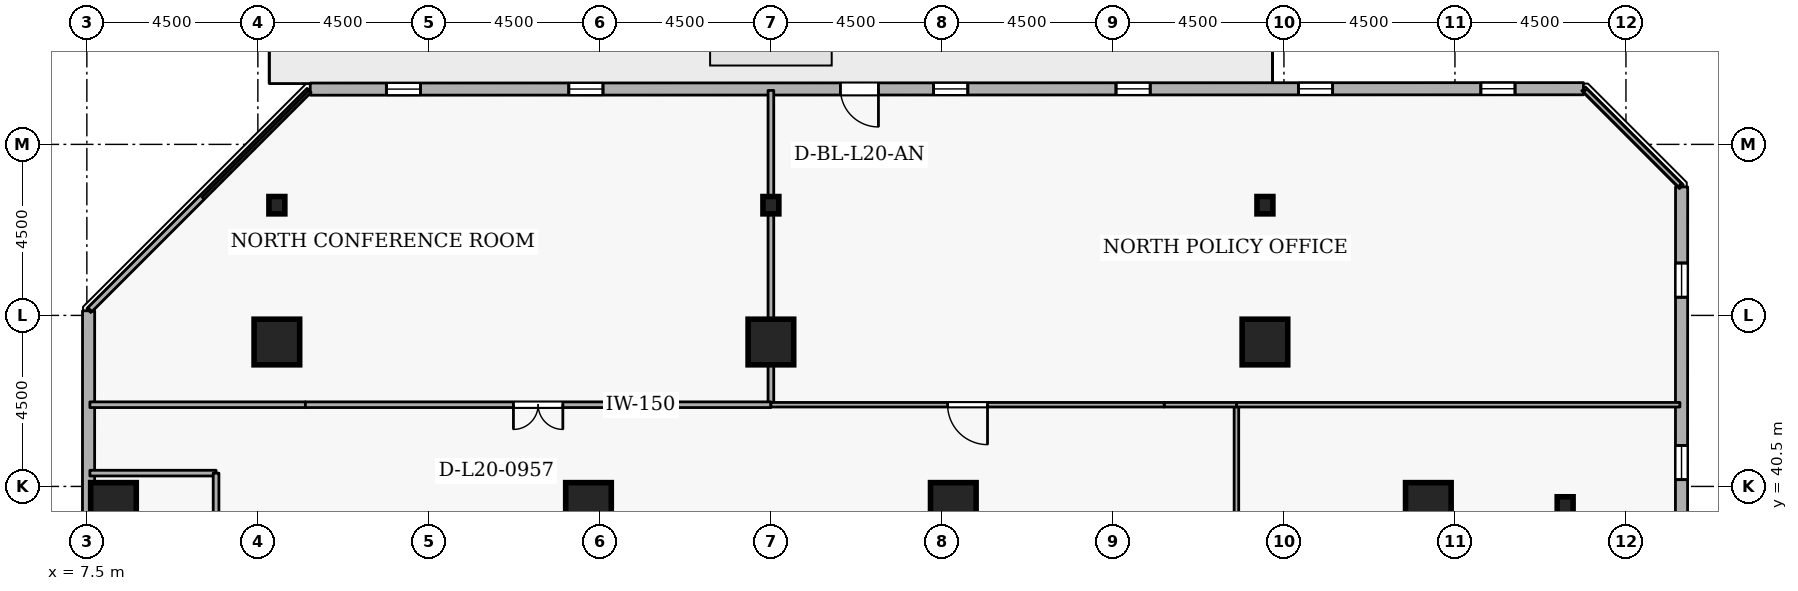
"""IFC4 building model, lengths in metres.
Left out: names, types, materials, properties, quantities, classifications, styles, units other than length and angle.
Written with IfcOpenShell. Run it as: python <this file> out.ifc"""

import sys

from ifc_helpers import new_model, si_unit, direction, frame, frame_2d, origin, origin_2d, place, context, subcontext, project, spatial, rectangle, i_section, extrude, element, fill, save


model = new_model("IFC4")
c1 = context("Model", 3, precision=1e-05, world=origin(), true_north=direction((0.0, 1.0)))
c2 = subcontext(c1, "Body", "Model", "MODEL_VIEW")
j1 = project(units=[si_unit("LENGTHUNIT", "METRE"), si_unit("PLANEANGLEUNIT", "RADIAN")], contexts=[c1])
p1 = place(None, origin())
s1 = spatial("IfcSite", under=j1, at=p1, CompositionType="ELEMENT")
p2 = place(p1, origin())
s2 = spatial("IfcBuilding", under=s1, at=p2, CompositionType="ELEMENT")
p3 = place(p2, frame((0.0, 0.0, 80.1)))
s3 = spatial("IfcBuildingStorey", under=s2, at=p3, CompositionType="ELEMENT", Elevation=80.1)
for number, where, z_axis, x_axis in (
    (1, (42.8, 40.0, 0.0), (0.0, 0.0, 1.0), (1.0, 0.0, 0.0)),
    (2, (12.5, 44.3, 0.0), (0.0, 0.0, 1.0), (1.0, 0.0, 0.0)),
    (3, (25.5, 44.3, 0.0), (0.0, 0.0, 1.0), (1.0, 0.0, 0.0)),
    (4, (38.5, 44.3, 0.0), (0.0, 0.0, 1.0), (1.0, 0.0, 0.0)),
    (5, (8.2, 40.0, 0.0), (0.0, 0.0, 1.0), (1.0, 0.0, 0.0)),
    (6, (20.7, 40.0, 0.0), (0.0, 0.0, 1.0), (1.0, 0.0, 0.0)),
    (7, (30.3, 40.0, 0.0), (0.0, 0.0, 1.0), (1.0, 0.0, 0.0)),
):
    element("IfcColumn", number, at=place(p3, frame(where, z_axis=z_axis, x_axis=x_axis)), inside=s3, PredefinedType="COLUMN", context=c2, shape_type="SweptSolid", body=[
        extrude(rectangle(XDim=1.2, YDim=1.2, at=origin_2d()), origin(), (0.0, 0.0, 1.0), 3.6),
    ])
for number, where, z_axis, x_axis in (
    (8, (46.4, 40.0, 0.0), (0.0, 0.0, 1.0), (1.0, 0.0, 0.0)),
    (9, (12.5, 47.9, 0.0), (0.0, 0.0, 1.0), (1.0, 0.0, 0.0)),
    (10, (25.5, 47.9, 0.0), (0.0, 0.0, 1.0), (1.0, 0.0, 0.0)),
    (11, (38.5, 47.9, 0.0), (0.0, 0.0, 1.0), (1.0, 0.0, 0.0)),
):
    element("IfcColumn", number, at=place(p3, frame(where, z_axis=z_axis, x_axis=x_axis)), inside=s3, PredefinedType="COLUMN", context=c2, shape_type="SweptSolid", body=[
        extrude(i_section(OverallWidth=0.418, OverallDepth=0.456, WebThickness=0.042, FlangeThickness=0.067, FilletRadius=0.015, at=origin_2d()), origin(), (0.0, 0.0, 1.0), 3.6),
    ])
p4 = place(p3, frame((49.454, 14.878, 0.0), z_axis=(0.0, 0.0, 1.0), x_axis=(0.000313347115, 0.999999950907, 0.0)))
e12 = element("IfcWall", 12, at=p4, inside=s3, PredefinedType="STANDARD", context=c2, shape_type="SweptSolid", body=[
    extrude(rectangle(XDim=33.503, YDim=0.32, at=frame_2d((16.751, 0.0))), origin(), (0.0, 0.0, 1.0), 2.7),
])
p5 = place(p4, frame((1.8, 0.0, 0.72)))
e13 = element("IfcOpeningElement", 13, at=p5, cuts=e12, PredefinedType="OPENING", context=c2, shape_type="SweptSolid", body=[
    extrude(rectangle(XDim=0.9, YDim=1.75, at=frame_2d((0.45, 0.875))), frame((0.0, 0.17, 0.0), z_axis=(0.0, -1.0, 0.0), x_axis=(1.0, 0.0, 0.0)), (0.0, 0.0, 1.0), 0.34),
])
p6 = place(p4, frame((6.6, 0.0, 0.72)))
e14 = element("IfcOpeningElement", 14, at=p6, cuts=e12, PredefinedType="OPENING", context=c2, shape_type="SweptSolid", body=[
    extrude(rectangle(XDim=0.9, YDim=1.75, at=frame_2d((0.45, 0.875))), frame((0.0, 0.17, 0.0), z_axis=(0.0, -1.0, 0.0), x_axis=(1.0, 0.0, 0.0)), (0.0, 0.0, 1.0), 0.34),
])
p7 = place(p4, frame((16.2, 0.0, 0.72)))
e15 = element("IfcOpeningElement", 15, at=p7, cuts=e12, PredefinedType="OPENING", context=c2, shape_type="SweptSolid", body=[
    extrude(rectangle(XDim=0.9, YDim=1.75, at=frame_2d((0.45, 0.875))), frame((0.0, 0.17, 0.0), z_axis=(0.0, -1.0, 0.0), x_axis=(1.0, 0.0, 0.0)), (0.0, 0.0, 1.0), 0.34),
])
p8 = place(p4, frame((21.0, 0.0, 0.72)))
e16 = element("IfcOpeningElement", 16, at=p8, cuts=e12, PredefinedType="OPENING", context=c2, shape_type="SweptSolid", body=[
    extrude(rectangle(XDim=0.9, YDim=1.75, at=frame_2d((0.45, 0.875))), frame((0.0, 0.17, 0.0), z_axis=(0.0, -1.0, 0.0), x_axis=(1.0, 0.0, 0.0)), (0.0, 0.0, 1.0), 0.34),
])
p9 = place(p4, frame((25.8, 0.0, 0.72)))
e17 = element("IfcOpeningElement", 17, at=p9, cuts=e12, PredefinedType="OPENING", context=c2, shape_type="SweptSolid", body=[
    extrude(rectangle(XDim=0.9, YDim=1.75, at=frame_2d((0.45, 0.875))), frame((0.0, 0.17, 0.0), z_axis=(0.0, -1.0, 0.0), x_axis=(1.0, 0.0, 0.0)), (0.0, 0.0, 1.0), 0.34),
])
p10 = place(p4, frame((30.6, 0.0, 0.72)))
e18 = element("IfcOpeningElement", 18, at=p10, cuts=e12, PredefinedType="OPENING", context=c2, shape_type="SweptSolid", body=[
    extrude(rectangle(XDim=0.9, YDim=1.75, at=frame_2d((0.45, 0.875))), frame((0.0, 0.17, 0.0), z_axis=(0.0, -1.0, 0.0), x_axis=(1.0, 0.0, 0.0)), (0.0, 0.0, 1.0), 0.34),
])
p11 = place(p3, frame((46.881, 50.965, 0.0), z_axis=(0.0, 0.0, 1.0), x_axis=(-0.999999950907, -0.000313347115, 0.0)))
e19 = element("IfcWall", 19, at=p11, inside=s3, PredefinedType="STANDARD", context=c2, shape_type="SweptSolid", body=[
    extrude(rectangle(XDim=33.503, YDim=0.32, at=frame_2d((16.751, 0.0))), origin(), (0.0, 0.0, 1.0), 2.7),
])
p12 = place(p11, frame((18.552, 0.0, 0.0)))
e20 = element("IfcOpeningElement", 20, at=p12, cuts=e19, PredefinedType="OPENING", context=c2, shape_type="SweptSolid", body=[
    extrude(rectangle(XDim=1.0, YDim=2.08, at=frame_2d((0.5, 1.04))), frame((0.0, 0.17, 0.0), z_axis=(0.0, -1.0, 0.0), x_axis=(1.0, 0.0, 0.0)), (0.0, 0.0, 1.0), 0.34),
])
p13 = place(p11, frame((1.8, 0.0, 0.72)))
e21 = element("IfcOpeningElement", 21, at=p13, cuts=e19, PredefinedType="OPENING", context=c2, shape_type="SweptSolid", body=[
    extrude(rectangle(XDim=0.9, YDim=1.75, at=frame_2d((0.45, 0.875))), frame((0.0, 0.17, 0.0), z_axis=(0.0, -1.0, 0.0), x_axis=(1.0, 0.0, 0.0)), (0.0, 0.0, 1.0), 0.34),
])
p14 = place(p11, frame((6.6, 0.0, 0.72)))
e22 = element("IfcOpeningElement", 22, at=p14, cuts=e19, PredefinedType="OPENING", context=c2, shape_type="SweptSolid", body=[
    extrude(rectangle(XDim=0.9, YDim=1.75, at=frame_2d((0.45, 0.875))), frame((0.0, 0.17, 0.0), z_axis=(0.0, -1.0, 0.0), x_axis=(1.0, 0.0, 0.0)), (0.0, 0.0, 1.0), 0.34),
])
p15 = place(p11, frame((11.4, 0.0, 0.72)))
e23 = element("IfcOpeningElement", 23, at=p15, cuts=e19, PredefinedType="OPENING", context=c2, shape_type="SweptSolid", body=[
    extrude(rectangle(XDim=0.9, YDim=1.75, at=frame_2d((0.45, 0.875))), frame((0.0, 0.17, 0.0), z_axis=(0.0, -1.0, 0.0), x_axis=(1.0, 0.0, 0.0)), (0.0, 0.0, 1.0), 0.34),
])
p16 = place(p11, frame((16.2, 0.0, 0.72)))
e24 = element("IfcOpeningElement", 24, at=p16, cuts=e19, PredefinedType="OPENING", context=c2, shape_type="SweptSolid", body=[
    extrude(rectangle(XDim=0.9, YDim=1.75, at=frame_2d((0.45, 0.875))), frame((0.0, 0.17, 0.0), z_axis=(0.0, -1.0, 0.0), x_axis=(1.0, 0.0, 0.0)), (0.0, 0.0, 1.0), 0.34),
])
p17 = place(p11, frame((25.8, 0.0, 0.72)))
e25 = element("IfcOpeningElement", 25, at=p17, cuts=e19, PredefinedType="OPENING", context=c2, shape_type="SweptSolid", body=[
    extrude(rectangle(XDim=0.9, YDim=1.75, at=frame_2d((0.45, 0.875))), frame((0.0, 0.17, 0.0), z_axis=(0.0, -1.0, 0.0), x_axis=(1.0, 0.0, 0.0)), (0.0, 0.0, 1.0), 0.34),
])
p18 = place(p11, frame((30.6, 0.0, 0.72)))
e26 = element("IfcOpeningElement", 26, at=p18, cuts=e19, PredefinedType="OPENING", context=c2, shape_type="SweptSolid", body=[
    extrude(rectangle(XDim=0.9, YDim=1.75, at=frame_2d((0.45, 0.875))), frame((0.0, 0.17, 0.0), z_axis=(0.0, -1.0, 0.0), x_axis=(1.0, 0.0, 0.0)), (0.0, 0.0, 1.0), 0.34),
])
p19 = place(p3, frame((7.546, 45.122, 0.0), z_axis=(0.0, 0.0, 1.0), x_axis=(-0.000313347115, -0.999999950907, 0.0)))
e27 = element("IfcWall", 27, at=p19, inside=s3, PredefinedType="STANDARD", context=c2, shape_type="SweptSolid", body=[
    extrude(rectangle(XDim=33.503, YDim=0.32, at=frame_2d((16.751, 0.0))), origin(), (0.0, 0.0, 1.0), 2.7),
])
p20 = place(p19, frame((6.6, 0.0, 0.72)))
e28 = element("IfcOpeningElement", 28, at=p20, cuts=e27, PredefinedType="OPENING", context=c2, shape_type="SweptSolid", body=[
    extrude(rectangle(XDim=0.9, YDim=1.75, at=frame_2d((0.45, 0.875))), frame((0.0, 0.17, 0.0), z_axis=(0.0, -1.0, 0.0), x_axis=(1.0, 0.0, 0.0)), (0.0, 0.0, 1.0), 0.34),
])
p21 = place(p19, frame((11.4, 0.0, 0.72)))
e29 = element("IfcOpeningElement", 29, at=p21, cuts=e27, PredefinedType="OPENING", context=c2, shape_type="SweptSolid", body=[
    extrude(rectangle(XDim=0.9, YDim=1.75, at=frame_2d((0.45, 0.875))), frame((0.0, 0.17, 0.0), z_axis=(0.0, -1.0, 0.0), x_axis=(1.0, 0.0, 0.0)), (0.0, 0.0, 1.0), 0.34),
])
p22 = place(p19, frame((21.0, 0.0, 0.72)))
e30 = element("IfcOpeningElement", 30, at=p22, cuts=e27, PredefinedType="OPENING", context=c2, shape_type="SweptSolid", body=[
    extrude(rectangle(XDim=0.9, YDim=1.75, at=frame_2d((0.45, 0.875))), frame((0.0, 0.17, 0.0), z_axis=(0.0, -1.0, 0.0), x_axis=(1.0, 0.0, 0.0)), (0.0, 0.0, 1.0), 0.34),
])
p23 = place(p19, frame((25.8, 0.0, 0.72)))
e31 = element("IfcOpeningElement", 31, at=p23, cuts=e27, PredefinedType="OPENING", context=c2, shape_type="SweptSolid", body=[
    extrude(rectangle(XDim=0.9, YDim=1.75, at=frame_2d((0.45, 0.875))), frame((0.0, 0.17, 0.0), z_axis=(0.0, -1.0, 0.0), x_axis=(1.0, 0.0, 0.0)), (0.0, 0.0, 1.0), 0.34),
])
p24 = place(p3, frame((7.58, 40.85, 0.0), z_axis=(0.0, 0.0, 1.0), x_axis=(1.0, 0.0, 0.0)))
e32 = element("IfcWall", 32, at=p24, inside=s3, PredefinedType="PARTITIONING", context=c2, shape_type="SweptSolid", body=[
    extrude(rectangle(XDim=3.32, YDim=0.15, at=frame_2d((1.66, 0.0))), origin(), (0.0, 0.0, 1.0), 3.34),
])
p25 = place(p3, frame((10.9, 40.85, 0.0), z_axis=(0.0, 0.0, 1.0), x_axis=(0.0, -1.0, 0.0)))
e33 = element("IfcWall", 33, at=p25, inside=s3, PredefinedType="PARTITIONING", context=c2, shape_type="SweptSolid", body=[
    extrude(rectangle(XDim=4.912, YDim=0.15, at=frame_2d((2.456, 0.0))), origin(), (0.0, 0.0, 1.0), 3.34),
])
p26 = place(p3, frame((37.75, 33.3, 0.0), z_axis=(0.0, 0.0, 1.0), x_axis=(0.0, 1.0, 0.0)))
e34 = element("IfcWall", 34, at=p26, inside=s3, PredefinedType="PARTITIONING", context=c2, shape_type="SweptSolid", body=[
    extrude(rectangle(XDim=9.35, YDim=0.12, at=frame_2d((4.675, 0.0))), origin(), (0.0, 0.0, 1.0), 3.34),
])
p27 = place(p26, frame((4.15, 0.0, 0.0)))
e35 = element("IfcOpeningElement", 35, at=p27, cuts=e34, PredefinedType="OPENING", context=c2, shape_type="SweptSolid", body=[
    extrude(rectangle(XDim=1.05, YDim=2.1, at=frame_2d((0.525, 1.05))), frame((0.0, 0.07, 0.0), z_axis=(0.0, -1.0, 0.0), x_axis=(1.0, 0.0, 0.0)), (0.0, 0.0, 1.0), 0.14),
])
p28 = place(p3, frame((37.75, 42.65, 0.0), z_axis=(0.0, 0.0, 1.0), x_axis=(1.0, 0.0, 0.0)))
e36 = element("IfcWall", 36, at=p28, inside=s3, PredefinedType="PARTITIONING", context=c2, shape_type="SweptSolid", body=[
    extrude(rectangle(XDim=11.67, YDim=0.12, at=frame_2d((5.835, 0.0))), origin(), (0.0, 0.0, 1.0), 3.34),
])
p29 = place(p3, frame((13.25, 42.65, 0.0), z_axis=(0.0, 0.0, 1.0), x_axis=(-1.0, 0.0, 0.0)))
e37 = element("IfcWall", 37, at=p29, inside=s3, PredefinedType="PARTITIONING", context=c2, shape_type="SweptSolid", body=[
    extrude(rectangle(XDim=5.67, YDim=0.15, at=frame_2d((2.835, 0.0))), origin(), (0.0, 0.0, 1.0), 3.34),
])
p30 = place(p3, frame((7.58, 45.152, 0.0), z_axis=(0.0, 0.0, 1.0), x_axis=(0.707106781187, 0.707106781187, 0.0)))
e38 = element("IfcWall", 38, at=p30, inside=s3, PredefinedType="PARTITIONING", context=c2, shape_type="SweptSolid", body=[
    extrude(rectangle(XDim=8.156, YDim=0.15, at=frame_2d((4.078, 0.0))), origin(), (0.0, 0.0, 1.0), 3.34),
])
p31 = place(p3, frame((25.5, 50.92, 0.0), z_axis=(0.0, 0.0, 1.0), x_axis=(0.0, -1.0, 0.0)))
e39 = element("IfcWall", 39, at=p31, inside=s3, PredefinedType="PARTITIONING", context=c2, shape_type="SweptSolid", body=[
    extrude(rectangle(XDim=8.27, YDim=0.15, at=frame_2d((4.135, 0.0))), origin(), (0.0, 0.0, 1.0), 2.882),
])
p32 = place(p3, frame((25.5, 42.65, 0.0), z_axis=(0.0, 0.0, 1.0), x_axis=(-1.0, 0.0, 0.0)))
e40 = element("IfcWall", 40, at=p32, inside=s3, PredefinedType="PARTITIONING", context=c2, shape_type="SweptSolid", body=[
    extrude(rectangle(XDim=12.25, YDim=0.15, at=frame_2d((6.125, 0.0))), origin(), (0.0, 0.0, 1.0), 3.34),
])
p33 = place(p32, frame((5.475, 0.0, 0.0)))
e41 = element("IfcOpeningElement", 41, at=p33, cuts=e40, PredefinedType="OPENING", context=c2, shape_type="SweptSolid", body=[
    extrude(rectangle(XDim=1.3, YDim=2.12, at=frame_2d((0.65, 1.06))), frame((0.0, 0.085, 0.0), z_axis=(0.0, -1.0, 0.0), x_axis=(1.0, 0.0, 0.0)), (0.0, 0.0, 1.0), 0.17),
])
p34 = place(p3, frame((37.75, 42.65, 0.0), z_axis=(0.0, 0.0, 1.0), x_axis=(-1.0, 0.0, 0.0)))
e42 = element("IfcWall", 42, at=p34, inside=s3, PredefinedType="PARTITIONING", context=c2, shape_type="SweptSolid", body=[
    extrude(rectangle(XDim=1.9, YDim=0.12, at=frame_2d((0.95, 0.0))), origin(), (0.0, 0.0, 1.0), 2.895),
])
p35 = place(p3, frame((35.85, 42.65, 0.0), z_axis=(0.0, 0.0, 1.0), x_axis=(-1.0, 0.0, 0.0)))
e43 = element("IfcWall", 43, at=p35, inside=s3, PredefinedType="PARTITIONING", context=c2, shape_type="SweptSolid", body=[
    extrude(rectangle(XDim=10.35, YDim=0.12, at=frame_2d((5.175, 0.0))), origin(), (0.0, 0.0, 1.0), 2.895),
])
p36 = place(p35, frame((4.65, 0.0, 0.0)))
e44 = element("IfcOpeningElement", 44, at=p36, cuts=e43, PredefinedType="OPENING", context=c2, shape_type="SweptSolid", body=[
    extrude(rectangle(XDim=1.05, YDim=2.1, at=frame_2d((0.525, 1.05))), frame((0.0, 0.07, 0.0), z_axis=(0.0, -1.0, 0.0), x_axis=(1.0, 0.0, 0.0)), (0.0, 0.0, 1.0), 0.14),
])
p37 = place(p3, frame((46.925, 50.92, 0.0), z_axis=(0.0, 0.0, 1.0), x_axis=(0.707106781187, -0.707106781187, 0.0)))
e45 = element("IfcWall", 45, at=p37, inside=s3, PredefinedType="PARTITIONING", context=c2, shape_type="SweptSolid", body=[
    extrude(rectangle(XDim=3.528, YDim=0.12, at=frame_2d((1.764, 0.0))), origin(), (0.0, 0.0, 1.0), 3.34),
])
p38 = place(p9, origin())
e46 = element("IfcWindow", 46, at=p38, inside=s3, PartitioningType="SINGLE_PANEL", PredefinedType="WINDOW", context=c2, shape_type="SweptSolid", body=[
    extrude(rectangle(XDim=0.9, YDim=1.75, at=frame_2d((0.45, 0.875))), frame((0.0, 0.03, 0.0), z_axis=(0.0, -1.0, 0.0), x_axis=(1.0, 0.0, 0.0)), (0.0, 0.0, 1.0), 0.06),
])
fill(e17, e46)
p39 = place(p10, origin())
e47 = element("IfcWindow", 47, at=p39, inside=s3, PartitioningType="SINGLE_PANEL", PredefinedType="WINDOW", context=c2, shape_type="SweptSolid", body=[
    extrude(rectangle(XDim=0.9, YDim=1.75, at=frame_2d((0.45, 0.875))), frame((0.0, 0.03, 0.0), z_axis=(0.0, -1.0, 0.0), x_axis=(1.0, 0.0, 0.0)), (0.0, 0.0, 1.0), 0.06),
])
fill(e18, e47)
p40 = place(p12, origin())
e48 = element("IfcDoor", 48, at=p40, inside=s3, OperationType="SINGLE_SWING_LEFT", PredefinedType="DOOR", context=c2, shape_type="SweptSolid", body=[
    extrude(rectangle(XDim=1.0, YDim=2.08, at=frame_2d((0.5, 1.04))), frame((0.0, 0.025, 0.0), z_axis=(0.0, -1.0, 0.0), x_axis=(1.0, 0.0, 0.0)), (0.0, 0.0, 1.0), 0.05),
])
fill(e20, e48)
p41 = place(p13, origin())
e49 = element("IfcWindow", 49, at=p41, inside=s3, PartitioningType="SINGLE_PANEL", PredefinedType="WINDOW", context=c2, shape_type="SweptSolid", body=[
    extrude(rectangle(XDim=0.9, YDim=1.75, at=frame_2d((0.45, 0.875))), frame((0.0, 0.03, 0.0), z_axis=(0.0, -1.0, 0.0), x_axis=(1.0, 0.0, 0.0)), (0.0, 0.0, 1.0), 0.06),
])
fill(e21, e49)
p42 = place(p14, origin())
e50 = element("IfcWindow", 50, at=p42, inside=s3, PartitioningType="SINGLE_PANEL", PredefinedType="WINDOW", context=c2, shape_type="SweptSolid", body=[
    extrude(rectangle(XDim=0.9, YDim=1.75, at=frame_2d((0.45, 0.875))), frame((0.0, 0.03, 0.0), z_axis=(0.0, -1.0, 0.0), x_axis=(1.0, 0.0, 0.0)), (0.0, 0.0, 1.0), 0.06),
])
fill(e22, e50)
p43 = place(p15, origin())
e51 = element("IfcWindow", 51, at=p43, inside=s3, PartitioningType="SINGLE_PANEL", PredefinedType="WINDOW", context=c2, shape_type="SweptSolid", body=[
    extrude(rectangle(XDim=0.9, YDim=1.75, at=frame_2d((0.45, 0.875))), frame((0.0, 0.03, 0.0), z_axis=(0.0, -1.0, 0.0), x_axis=(1.0, 0.0, 0.0)), (0.0, 0.0, 1.0), 0.06),
])
fill(e23, e51)
p44 = place(p16, origin())
e52 = element("IfcWindow", 52, at=p44, inside=s3, PartitioningType="SINGLE_PANEL", PredefinedType="WINDOW", context=c2, shape_type="SweptSolid", body=[
    extrude(rectangle(XDim=0.9, YDim=1.75, at=frame_2d((0.45, 0.875))), frame((0.0, 0.03, 0.0), z_axis=(0.0, -1.0, 0.0), x_axis=(1.0, 0.0, 0.0)), (0.0, 0.0, 1.0), 0.06),
])
fill(e24, e52)
p45 = place(p17, origin())
e53 = element("IfcWindow", 53, at=p45, inside=s3, PartitioningType="SINGLE_PANEL", PredefinedType="WINDOW", context=c2, shape_type="SweptSolid", body=[
    extrude(rectangle(XDim=0.9, YDim=1.75, at=frame_2d((0.45, 0.875))), frame((0.0, 0.03, 0.0), z_axis=(0.0, -1.0, 0.0), x_axis=(1.0, 0.0, 0.0)), (0.0, 0.0, 1.0), 0.06),
])
fill(e25, e53)
p46 = place(p18, origin())
e54 = element("IfcWindow", 54, at=p46, inside=s3, PartitioningType="SINGLE_PANEL", PredefinedType="WINDOW", context=c2, shape_type="SweptSolid", body=[
    extrude(rectangle(XDim=0.9, YDim=1.75, at=frame_2d((0.45, 0.875))), frame((0.0, 0.03, 0.0), z_axis=(0.0, -1.0, 0.0), x_axis=(1.0, 0.0, 0.0)), (0.0, 0.0, 1.0), 0.06),
])
fill(e26, e54)
p47 = place(p33, origin())
e55 = element("IfcDoor", 55, at=p47, inside=s3, OperationType="DOUBLE_DOOR_SINGLE_SWING", PredefinedType="DOOR", context=c2, shape_type="SweptSolid", body=[
    extrude(rectangle(XDim=1.3, YDim=2.12, at=frame_2d((0.65, 1.06))), frame((0.0, 0.025, 0.0), z_axis=(0.0, -1.0, 0.0), x_axis=(1.0, 0.0, 0.0)), (0.0, 0.0, 1.0), 0.05),
])
fill(e41, e55)
p48 = place(p36, origin())
e56 = element("IfcDoor", 56, at=p48, inside=s3, OperationType="SINGLE_SWING_LEFT", PredefinedType="DOOR", context=c2, shape_type="SweptSolid", body=[
    extrude(rectangle(XDim=1.05, YDim=2.1, at=frame_2d((0.525, 1.05))), frame((0.0, 0.025, 0.0), z_axis=(0.0, -1.0, 0.0), x_axis=(1.0, 0.0, 0.0)), (0.0, 0.0, 1.0), 0.05),
])
fill(e44, e56)
save(model, sys.argv[1])
